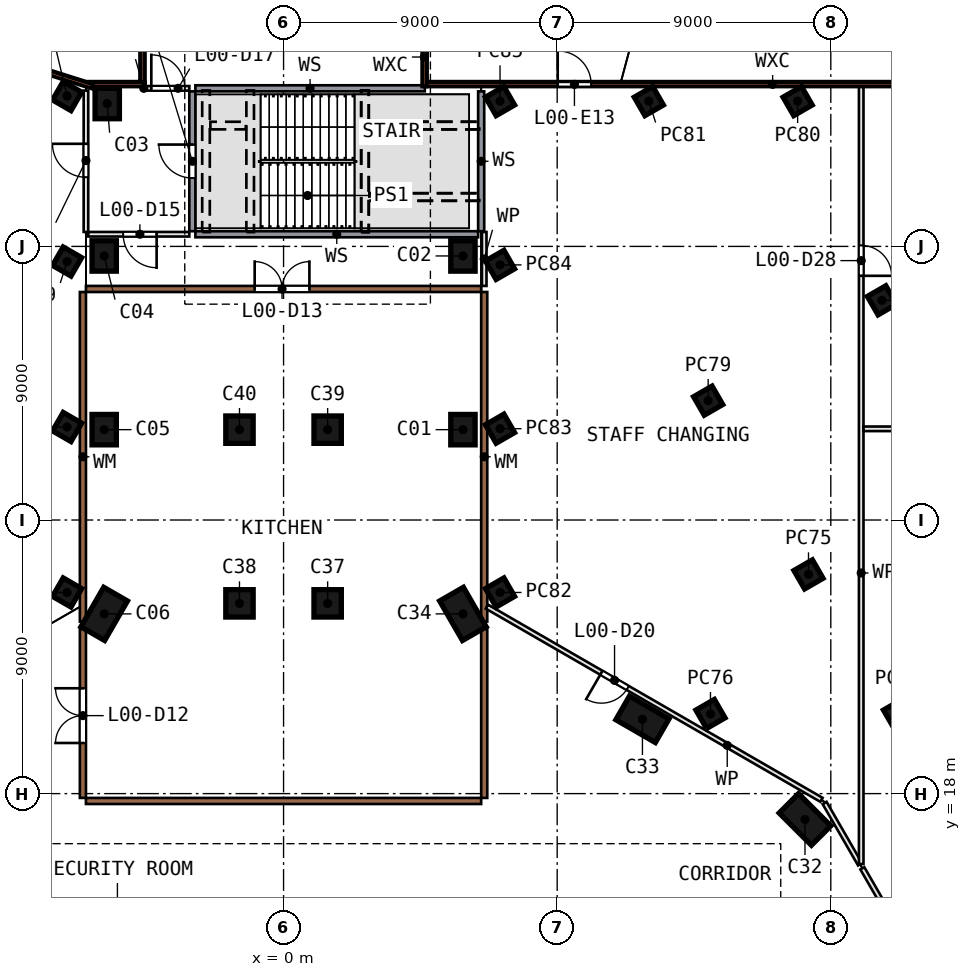
"""IFC4 building model, lengths in metres.
Left out: names, types, materials, properties, quantities, classifications, styles, units other than length and angle.
Written with IfcOpenShell. Run it as: python <this file> out.ifc"""

import sys

from ifc_helpers import new_model, si_unit, direction, frame, frame_2d, origin, origin_2d, place, context, subcontext, project, spatial, rectangle, extrude, element, fill, save


model = new_model("IFC4")
c1 = context("Model", 3, precision=1e-05, world=origin(), true_north=direction((0.0, 1.0)))
c2 = subcontext(c1, "Body", "Model", "MODEL_VIEW")
j1 = project(units=[si_unit("LENGTHUNIT", "METRE"), si_unit("PLANEANGLEUNIT", "RADIAN")], contexts=[c1])
p1 = place(None, origin())
s1 = spatial("IfcSite", under=j1, at=p1, CompositionType="ELEMENT")
p2 = place(p1, origin())
s2 = spatial("IfcBuilding", under=s1, at=p2, CompositionType="ELEMENT")
p3 = place(p2, origin())
s3 = spatial("IfcBuildingStorey", under=s2, at=p3, CompositionType="ELEMENT", Elevation=0.0)
for number, where, z_axis, x_axis in (
    (1, (5.9, 29.972, 0.0), (0.0, 0.0, 1.0), (0.0, 1.0, 0.0)),
    (2, (5.9, 35.686, 0.0), (0.0, 0.0, 1.0), (0.0, 1.0, 0.0)),
    (3, (-5.8, 40.7, 0.0), (0.0, 0.0, 1.0), (0.0, -1.0, 0.0)),
    (4, (-5.9, 35.686, 0.0), (0.0, 0.0, 1.0), (0.0, -1.0, 0.0)),
    (5, (-5.9, 29.972, 0.0), (0.0, 0.0, 1.0), (0.0, -1.0, 0.0)),
):
    element("IfcColumn", number, at=place(p3, frame(where, z_axis=z_axis, x_axis=x_axis)), inside=s3, PredefinedType="COLUMN", context=c2, shape_type="SweptSolid", body=[
        extrude(rectangle(XDim=1.0, YDim=0.8, at=origin_2d()), origin(), (0.0, 0.0, 1.0), 7.55),
    ])
for number, where, z_axis, x_axis in (
    (6, (-5.9, 23.912, 0.0), (0.0, 0.0, 1.0), (0.5, 0.866, 0.0)),
    (7, (17.151, 17.151, 0.0), (0.0, 0.0, 1.0), (0.707, -0.707, 0.0)),
    (8, (11.804, 20.445, 0.0), (0.0, 0.0, 1.0), (-0.866, 0.5, 0.0)),
    (9, (5.9, 23.912, 0.0), (0.0, 0.0, 1.0), (0.5, -0.866, 0.0)),
):
    element("IfcColumn", number, at=place(p3, frame(where, z_axis=z_axis, x_axis=x_axis)), inside=s3, PredefinedType="COLUMN", context=c2, shape_type="SweptSolid", body=[
        extrude(rectangle(XDim=1.5, YDim=0.9, at=origin_2d()), origin(), (0.0, 0.0, 1.0), 7.55),
    ])
for number, where, z_axis, x_axis in (
    (10, (1.45, 24.258, 0.0), (0.0, 0.0, 1.0), (0.0, 1.0, 0.0)),
    (11, (-1.45, 24.258, 0.0), (0.0, 0.0, 1.0), (0.0, 1.0, 0.0)),
    (12, (1.45, 29.972, 0.0), (0.0, 0.0, 1.0), (0.0, 1.0, 0.0)),
    (13, (-1.45, 29.972, 0.0), (0.0, 0.0, 1.0), (0.0, 1.0, 0.0)),
):
    element("IfcColumn", number, at=place(p3, frame(where, z_axis=z_axis, x_axis=x_axis)), inside=s3, PredefinedType="COLUMN", context=c2, shape_type="SweptSolid", body=[
        extrude(rectangle(XDim=0.9, YDim=0.9, at=origin_2d()), origin(), (0.0, 0.0, 1.0), 7.55),
    ])
for number, where, z_axis, x_axis in (
    (14, (-7.12, 40.946, 0.0), (0.0, 0.0, 1.0), (-0.866, 0.5, 0.0)),
    (15, (-7.12, 35.503, 0.0), (0.0, 0.0, 1.0), (-0.866, 0.5, 0.0)),
    (16, (-7.12, 30.059, 0.0), (0.0, 0.0, 1.0), (-0.866, 0.5, 0.0)),
    (17, (-7.12, 24.616, 0.0), (0.0, 0.0, 1.0), (-0.866, 0.5, 0.0)),
    (18, (20.211, 20.62, 0.0), (0.0, 0.0, 1.0), (0.866, 0.5, 0.0)),
    (19, (17.266, 25.211, 0.0), (0.0, 0.0, 1.0), (0.866, 0.5, 0.0)),
    (20, (14.042, 20.62, 0.0), (0.0, 0.0, 1.0), (0.866, 0.5, 0.0)),
    (21, (19.682, 34.227, 0.0), (0.0, 0.0, 1.0), (0.866, 0.5, 0.0)),
    (22, (13.966, 30.927, 0.0), (0.0, 0.0, 1.0), (0.866, 0.5, 0.0)),
    (23, (16.909, 40.78, 0.0), (0.0, 0.0, 1.0), (0.866, 0.5, 0.0)),
    (24, (12.014, 40.78, 0.0), (0.0, 0.0, 1.0), (0.866, 0.5, 0.0)),
    (25, (7.12, 24.616, 0.0), (0.0, 0.0, 1.0), (0.866, 0.5, 0.0)),
    (26, (7.12, 30.004, 0.0), (0.0, 0.0, 1.0), (0.866, 0.5, 0.0)),
    (27, (7.12, 35.392, 0.0), (0.0, 0.0, 1.0), (0.866, 0.5, 0.0)),
    (28, (7.12, 40.78, 0.0), (0.0, 0.0, 1.0), (0.866, 0.5, 0.0)),
):
    element("IfcColumn", number, at=place(p3, frame(where, z_axis=z_axis, x_axis=x_axis)), inside=s3, PredefinedType="COLUMN", context=c2, shape_type="SweptSolid", body=[
        extrude(rectangle(XDim=0.7, YDim=0.7, at=origin_2d()), origin(), (0.0, 0.0, 1.0), 8.0),
    ])
p4 = place(p3, frame((4.7, 41.33, 0.0), z_axis=(0.0, 0.0, 1.0), x_axis=(1.0, 0.0, 0.0)))
e29 = element("IfcWall", 29, at=p4, inside=s3, PredefinedType="SOLIDWALL", context=c2, shape_type="SweptSolid", body=[
    extrude(rectangle(XDim=17.156, YDim=0.14, at=frame_2d((8.578, 0.0))), origin(), (0.0, 0.0, 1.0), 7.55),
])
p5 = place(p4, frame((4.317, 0.0, 0.0)))
e30 = element("IfcOpeningElement", 30, at=p5, cuts=e29, PredefinedType="OPENING", context=c2, shape_type="SweptSolid", body=[
    extrude(rectangle(XDim=1.1, YDim=2.4, at=frame_2d((0.55, 1.2))), frame((0.0, 0.08, 0.0), z_axis=(0.0, -1.0, 0.0), x_axis=(1.0, 0.0, 0.0)), (0.0, 0.0, 1.0), 0.16),
])
p6 = place(p3, frame((4.63, 41.26, 0.0), z_axis=(0.0, 0.0, 1.0), x_axis=(0.0, 1.0, 0.0)))
e31 = element("IfcWall", 31, at=p6, inside=s3, PredefinedType="SOLIDWALL", context=c2, shape_type="SweptSolid", body=[
    extrude(rectangle(XDim=1.94, YDim=0.14, at=frame_2d((0.97, 0.0))), origin(), (0.0, 0.0, 1.0), 7.55),
])
p7 = place(p3, frame((-4.63, 43.06, 0.0), z_axis=(0.0, 0.0, 1.0), x_axis=(0.0, -1.0, 0.0)))
e32 = element("IfcWall", 32, at=p7, inside=s3, PredefinedType="SOLIDWALL", context=c2, shape_type="SweptSolid", body=[
    extrude(rectangle(XDim=1.66, YDim=0.14, at=frame_2d((0.83, 0.0))), origin(), (0.0, 0.0, 1.0), 7.55),
])
p8 = place(p3, frame((-4.56, 41.33, 0.0), z_axis=(0.0, 0.0, 1.0), x_axis=(-1.0, 0.0, 0.0)))
e33 = element("IfcWall", 33, at=p8, inside=s3, PredefinedType="SOLIDWALL", context=c2, shape_type="SweptSolid", body=[
    extrude(rectangle(XDim=1.719, YDim=0.14, at=frame_2d((0.859, 0.0))), origin(), (0.0, 0.0, 1.0), 7.55),
])
p9 = place(p3, frame((-6.289, 41.26, 0.0), z_axis=(0.0, 0.0, 1.0), x_axis=(-0.953524528, 0.301315407, 0.0)))
e34 = element("IfcWall", 34, at=p9, inside=s3, PredefinedType="SOLIDWALL", context=c2, shape_type="SweptSolid", body=[
    extrude(rectangle(XDim=12.38, YDim=0.14, at=frame_2d((6.19, 0.0))), origin(), (0.0, 0.0, 1.0), 7.55),
])
p10 = place(p3, frame((-6.5, 17.758, 0.0), z_axis=(0.0, 0.0, 1.0), x_axis=(1.0, 0.0, 0.0)))
e35 = element("IfcWall", 35, at=p10, inside=s3, PredefinedType="SOLIDWALL", context=c2, shape_type="SweptSolid", body=[
    extrude(rectangle(XDim=13.0, YDim=0.2, at=frame_2d((6.5, 0.0))), origin(), (0.0, 0.0, 1.0), 7.55),
])
p11 = place(p3, frame((-6.6, 17.858, 0.0), z_axis=(0.0, 0.0, 1.0), x_axis=(0.0, 1.0, 0.0)))
e36 = element("IfcWall", 36, at=p11, inside=s3, PredefinedType="SOLIDWALL", context=c2, shape_type="SweptSolid", body=[
    extrude(rectangle(XDim=5.557, YDim=0.2, at=frame_2d((2.778, 0.0))), origin(), (0.0, 0.0, 1.0), 7.55),
])
p12 = place(p11, frame((1.807, 0.0, 0.0)))
e37 = element("IfcOpeningElement", 37, at=p12, cuts=e36, PredefinedType="OPENING", context=c2, shape_type="SweptSolid", body=[
    extrude(rectangle(XDim=1.8, YDim=2.1, at=frame_2d((0.9, 1.05))), frame((0.0, 0.11, 0.0), z_axis=(0.0, -1.0, 0.0), x_axis=(1.0, 0.0, 0.0)), (0.0, 0.0, 1.0), 0.22),
])
p13 = place(p3, frame((-6.6, 34.5, 0.0), z_axis=(0.0, 0.0, 1.0), x_axis=(0.0, -1.0, 0.0)))
e38 = element("IfcWall", 38, at=p13, inside=s3, PredefinedType="SOLIDWALL", context=c2, shape_type="SweptSolid", body=[
    extrude(rectangle(XDim=10.841, YDim=0.2, at=frame_2d((5.42, 0.0))), origin(), (0.0, 0.0, 1.0), 7.55),
])
p14 = place(p3, frame((-6.5, 34.6, 0.0), z_axis=(0.0, 0.0, 1.0), x_axis=(1.0, 0.0, 0.0)))
e39 = element("IfcWall", 39, at=p14, inside=s3, PredefinedType="SOLIDWALL", context=c2, shape_type="SweptSolid", body=[
    extrude(rectangle(XDim=13.0, YDim=0.2, at=frame_2d((6.5, 0.0))), origin(), (0.0, 0.0, 1.0), 7.55),
])
p15 = place(p14, frame((5.55, 0.0, 0.0)))
e40 = element("IfcOpeningElement", 40, at=p15, cuts=e39, PredefinedType="OPENING", context=c2, shape_type="SweptSolid", body=[
    extrude(rectangle(XDim=1.8, YDim=2.1, at=frame_2d((0.9, 1.05))), frame((0.0, 0.11, 0.0), z_axis=(0.0, -1.0, 0.0), x_axis=(1.0, 0.0, 0.0)), (0.0, 0.0, 1.0), 0.22),
])
p16 = place(p3, frame((-3.1, 36.4, 0.0), z_axis=(0.0, 0.0, 1.0), x_axis=(-1.0, 0.0, 0.0)))
e41 = element("IfcWall", 41, at=p16, inside=s3, PredefinedType="PARTITIONING", context=c2, shape_type="SweptSolid", body=[
    extrude(rectangle(XDim=3.325, YDim=0.15, at=frame_2d((1.663, 0.0))), origin(), (0.0, 0.0, 1.0), 7.55),
])
p17 = place(p16, frame((1.075, 0.0, 0.0)))
e42 = element("IfcOpeningElement", 42, at=p17, cuts=e41, PredefinedType="OPENING", context=c2, shape_type="SweptSolid", body=[
    extrude(rectangle(XDim=1.1, YDim=2.1, at=frame_2d((0.55, 1.05))), frame((0.0, 0.085, 0.0), z_axis=(0.0, -1.0, 0.0), x_axis=(1.0, 0.0, 0.0)), (0.0, 0.0, 1.0), 0.17),
])
p18 = place(p3, frame((-6.5, 36.475, 0.0), z_axis=(0.0, 0.0, 1.0), x_axis=(0.0, 1.0, 0.0)))
e43 = element("IfcWall", 43, at=p18, inside=s3, PredefinedType="PARTITIONING", context=c2, shape_type="SweptSolid", body=[
    extrude(rectangle(XDim=4.65, YDim=0.15, at=frame_2d((2.325, 0.0))), origin(), (0.0, 0.0, 1.0), 7.55),
])
p19 = place(p18, frame((1.8, 0.0, 0.0)))
e44 = element("IfcOpeningElement", 44, at=p19, cuts=e43, PredefinedType="OPENING", context=c2, shape_type="SweptSolid", body=[
    extrude(rectangle(XDim=1.1, YDim=2.1, at=frame_2d((0.55, 1.05))), frame((0.0, 0.085, 0.0), z_axis=(0.0, -1.0, 0.0), x_axis=(1.0, 0.0, 0.0)), (0.0, 0.0, 1.0), 0.17),
])
p20 = place(p3, frame((-2.9, 36.4, 0.0), z_axis=(0.0, 0.0, 1.0), x_axis=(1.0, 0.0, 0.0)))
e45 = element("IfcWall", 45, at=p20, inside=s3, PredefinedType="SOLIDWALL", context=c2, shape_type="SweptSolid", body=[
    extrude(rectangle(XDim=9.3, YDim=0.2, at=frame_2d((4.65, 0.0))), origin(), (0.0, 0.0, 1.0), 7.55),
])
p21 = place(p3, frame((-4.645, 41.2, 0.0), z_axis=(0.0, 0.0, 1.0), x_axis=(1.0, 0.0, 0.0)))
e46 = element("IfcWall", 46, at=p21, inside=s3, PredefinedType="PARTITIONING", context=c2, shape_type="SweptSolid", body=[
    extrude(rectangle(XDim=1.545, YDim=0.15, at=frame_2d((0.772, 0.0))), origin(), (0.0, 0.0, 1.0), 7.55),
])
p22 = place(p21, frame((0.295, 0.0, 0.0)))
e47 = element("IfcOpeningElement", 47, at=p22, cuts=e46, PredefinedType="OPENING", context=c2, shape_type="SweptSolid", body=[
    extrude(rectangle(XDim=1.1, YDim=2.1, at=frame_2d((0.55, 1.05))), frame((0.0, 0.085, 0.0), z_axis=(0.0, -1.0, 0.0), x_axis=(1.0, 0.0, 0.0)), (0.0, 0.0, 1.0), 0.17),
])
p23 = place(p3, frame((-3.0, 36.5, 0.0), z_axis=(0.0, 0.0, 1.0), x_axis=(0.0, 1.0, 0.0)))
e48 = element("IfcWall", 48, at=p23, inside=s3, PredefinedType="SOLIDWALL", context=c2, shape_type="SweptSolid", body=[
    extrude(rectangle(XDim=4.6, YDim=0.2, at=frame_2d((2.3, 0.0))), origin(), (0.0, 0.0, 1.0), 7.55),
])
p24 = place(p23, frame((1.75, 0.0, 0.0)))
e49 = element("IfcOpeningElement", 49, at=p24, cuts=e48, PredefinedType="OPENING", context=c2, shape_type="SweptSolid", body=[
    extrude(rectangle(XDim=1.1, YDim=2.1, at=frame_2d((0.55, 1.05))), frame((0.0, 0.11, 0.0), z_axis=(0.0, -1.0, 0.0), x_axis=(1.0, 0.0, 0.0)), (0.0, 0.0, 1.0), 0.22),
])
p25 = place(p3, frame((6.5, 36.5, 0.0), z_axis=(0.0, 0.0, 1.0), x_axis=(0.0, 1.0, 0.0)))
e50 = element("IfcWall", 50, at=p25, inside=s3, PredefinedType="SOLIDWALL", context=c2, shape_type="SweptSolid", body=[
    extrude(rectangle(XDim=4.6, YDim=0.2, at=frame_2d((2.3, 0.0))), origin(), (0.0, 0.0, 1.0), 7.55),
])
p26 = place(p3, frame((4.645, 41.2, 0.0), z_axis=(0.0, 0.0, 1.0), x_axis=(-1.0, 0.0, 0.0)))
e51 = element("IfcWall", 51, at=p26, inside=s3, PredefinedType="SOLIDWALL", context=c2, shape_type="SweptSolid", body=[
    extrude(rectangle(XDim=7.545, YDim=0.2, at=frame_2d((3.772, 0.0))), origin(), (0.0, 0.0, 1.0), 7.55),
])
p27 = place(p3, frame((6.6, 17.858, 0.0), z_axis=(0.0, 0.0, 1.0), x_axis=(0.0, 1.0, 0.0)))
e52 = element("IfcWall", 52, at=p27, inside=s3, PredefinedType="SOLIDWALL", context=c2, shape_type="SweptSolid", body=[
    extrude(rectangle(XDim=5.557, YDim=0.2, at=frame_2d((2.778, 0.0))), origin(), (0.0, 0.0, 1.0), 7.55),
])
p28 = place(p3, frame((6.6, 23.659, 0.0), z_axis=(0.0, 0.0, 1.0), x_axis=(0.0, 1.0, 0.0)))
e53 = element("IfcWall", 53, at=p28, inside=s3, PredefinedType="SOLIDWALL", context=c2, shape_type="SweptSolid", body=[
    extrude(rectangle(XDim=10.841, YDim=0.2, at=frame_2d((5.42, 0.0))), origin(), (0.0, 0.0, 1.0), 7.55),
])
p29 = place(p3, frame((17.693, 17.796, 0.0), z_axis=(0.0, 0.0, 1.0), x_axis=(-0.866027563, 0.499996261, 0.0)))
e54 = element("IfcWall", 54, at=p29, inside=s3, PredefinedType="PARTITIONING", context=c2, shape_type="SweptSolid", body=[
    extrude(rectangle(XDim=12.709, YDim=0.15, at=frame_2d((6.355, 0.0))), origin(), (0.0, 0.0, 1.0), 7.55),
])
p30 = place(p29, frame((7.36, 0.0, 0.0)))
e55 = element("IfcOpeningElement", 55, at=p30, cuts=e54, PredefinedType="OPENING", context=c2, shape_type="SweptSolid", body=[
    extrude(rectangle(XDim=1.0, YDim=2.1, at=frame_2d((0.5, 1.05))), frame((0.0, 0.085, 0.0), z_axis=(0.0, -1.0, 0.0), x_axis=(1.0, 0.0, 0.0)), (0.0, 0.0, 1.0), 0.17),
])
p31 = place(p3, frame((6.6, 34.7, 0.0), z_axis=(0.0, 0.0, 1.0), x_axis=(0.0, 1.0, 0.0)))
e56 = element("IfcWall", 56, at=p31, inside=s3, PredefinedType="PARTITIONING", context=c2, shape_type="SweptSolid", body=[
    extrude(rectangle(XDim=1.775, YDim=0.15, at=frame_2d((0.888, 0.0))), origin(), (0.0, 0.0, 1.0), 7.55),
])
p32 = place(p3, frame((17.796, 17.693, 0.0), z_axis=(0.0, 0.0, 1.0), x_axis=(0.50002133, -0.866013088, 0.0)))
e57 = element("IfcWall", 57, at=p32, inside=s3, PredefinedType="PARTITIONING", context=c2, shape_type="SweptSolid", body=[
    extrude(rectangle(XDim=2.333, YDim=0.15, at=frame_2d((1.167, 0.0))), origin(), (0.0, 0.0, 1.0), 7.55),
])
p33 = place(p3, frame((19.0, 41.26, 0.0), z_axis=(0.0, 0.0, 1.0), x_axis=(0.0, -1.0, 0.0)))
e58 = element("IfcWall", 58, at=p33, inside=s3, PredefinedType="PARTITIONING", context=c2, shape_type="SweptSolid", body=[
    extrude(rectangle(XDim=25.577, YDim=0.15, at=frame_2d((12.789, 0.0))), origin(), (0.0, 0.0, 1.0), 7.55),
])
p34 = place(p33, frame((5.227, 0.0, 0.0)))
e59 = element("IfcOpeningElement", 59, at=p34, cuts=e58, PredefinedType="OPENING", context=c2, shape_type="SweptSolid", body=[
    extrude(rectangle(XDim=1.0, YDim=2.1, at=frame_2d((0.5, 1.05))), frame((0.0, 0.085, 0.0), z_axis=(0.0, -1.0, 0.0), x_axis=(1.0, 0.0, 0.0)), (0.0, 0.0, 1.0), 0.17),
])
p35 = place(p3, frame((19.037, 15.543, 0.0), z_axis=(0.0, 0.0, 1.0), x_axis=(0.499986809, -0.866033019, 0.0)))
e60 = element("IfcWall", 60, at=p35, inside=s3, PredefinedType="PARTITIONING", context=c2, shape_type="SweptSolid", body=[
    extrude(rectangle(XDim=10.366, YDim=0.15, at=frame_2d((5.183, 0.0))), origin(), (0.0, 0.0, 1.0), 7.55),
])
p36 = place(p35, frame((4.95, 0.0, 0.0)))
e61 = element("IfcOpeningElement", 61, at=p36, cuts=e60, PredefinedType="OPENING", context=c2, shape_type="SweptSolid", body=[
    extrude(rectangle(XDim=1.0, YDim=2.1, at=frame_2d((0.5, 1.05))), frame((0.0, 0.085, 0.0), z_axis=(0.0, -1.0, 0.0), x_axis=(1.0, 0.0, 0.0)), (0.0, 0.0, 1.0), 0.17),
])
p37 = place(p3, frame((19.075, 30.0, 0.0), z_axis=(0.0, 0.0, 1.0), x_axis=(1.0, 0.0, 0.0)))
e62 = element("IfcWall", 62, at=p37, inside=s3, PredefinedType="PARTITIONING", context=c2, shape_type="SweptSolid", body=[
    extrude(rectangle(XDim=7.85, YDim=0.15, at=frame_2d((3.925, 0.0))), origin(), (0.0, 0.0, 1.0), 7.55),
])
p38 = place(p5, origin())
e63 = element("IfcDoor", 63, at=p38, inside=s3, OperationType="SINGLE_SWING_LEFT", PredefinedType="DOOR", context=c2, shape_type="SweptSolid", body=[
    extrude(rectangle(XDim=1.1, YDim=2.4, at=frame_2d((0.55, 1.2))), frame((0.0, 0.025, 0.0), z_axis=(0.0, -1.0, 0.0), x_axis=(1.0, 0.0, 0.0)), (0.0, 0.0, 1.0), 0.05),
])
fill(e30, e63)
p39 = place(p12, origin())
e64 = element("IfcDoor", 64, at=p39, inside=s3, OperationType="DOUBLE_DOOR_SINGLE_SWING", PredefinedType="DOOR", context=c2, shape_type="SweptSolid", body=[
    extrude(rectangle(XDim=1.8, YDim=2.1, at=frame_2d((0.9, 1.05))), frame((0.0, 0.025, 0.0), z_axis=(0.0, -1.0, 0.0), x_axis=(1.0, 0.0, 0.0)), (0.0, 0.0, 1.0), 0.05),
])
fill(e37, e64)
p40 = place(p15, origin())
e65 = element("IfcDoor", 65, at=p40, inside=s3, OperationType="DOUBLE_DOOR_SINGLE_SWING", PredefinedType="DOOR", context=c2, shape_type="SweptSolid", body=[
    extrude(rectangle(XDim=1.8, YDim=2.1, at=frame_2d((0.9, 1.05))), frame((0.0, 0.025, 0.0), z_axis=(0.0, -1.0, 0.0), x_axis=(1.0, 0.0, 0.0)), (0.0, 0.0, 1.0), 0.05),
])
fill(e40, e65)
p41 = place(p17, origin())
e66 = element("IfcDoor", 66, at=p41, inside=s3, OperationType="SINGLE_SWING_LEFT", PredefinedType="DOOR", context=c2, shape_type="SweptSolid", body=[
    extrude(rectangle(XDim=1.1, YDim=2.1, at=frame_2d((0.55, 1.05))), frame((0.0, 0.025, 0.0), z_axis=(0.0, -1.0, 0.0), x_axis=(1.0, 0.0, 0.0)), (0.0, 0.0, 1.0), 0.05),
])
fill(e42, e66)
p42 = place(p19, origin())
e67 = element("IfcDoor", 67, at=p42, inside=s3, OperationType="SINGLE_SWING_RIGHT", PredefinedType="DOOR", context=c2, shape_type="SweptSolid", body=[
    extrude(rectangle(XDim=1.1, YDim=2.1, at=frame_2d((0.55, 1.05))), frame((0.0, 0.025, 0.0), z_axis=(0.0, -1.0, 0.0), x_axis=(1.0, 0.0, 0.0)), (0.0, 0.0, 1.0), 0.05),
])
fill(e44, e67)
p43 = place(p22, origin())
e68 = element("IfcDoor", 68, at=p43, inside=s3, OperationType="SINGLE_SWING_LEFT", PredefinedType="DOOR", context=c2, shape_type="SweptSolid", body=[
    extrude(rectangle(XDim=1.1, YDim=2.1, at=frame_2d((0.55, 1.05))), frame((0.0, 0.025, 0.0), z_axis=(0.0, -1.0, 0.0), x_axis=(1.0, 0.0, 0.0)), (0.0, 0.0, 1.0), 0.05),
])
fill(e47, e68)
p44 = place(p24, origin())
e69 = element("IfcDoor", 69, at=p44, inside=s3, OperationType="SINGLE_SWING_RIGHT", PredefinedType="DOOR", context=c2, shape_type="SweptSolid", body=[
    extrude(rectangle(XDim=1.1, YDim=2.1, at=frame_2d((0.55, 1.05))), frame((0.0, 0.025, 0.0), z_axis=(0.0, -1.0, 0.0), x_axis=(1.0, 0.0, 0.0)), (0.0, 0.0, 1.0), 0.05),
])
fill(e49, e69)
p45 = place(p30, origin())
e70 = element("IfcDoor", 70, at=p45, inside=s3, OperationType="SINGLE_SWING_RIGHT", PredefinedType="DOOR", context=c2, shape_type="SweptSolid", body=[
    extrude(rectangle(XDim=1.0, YDim=2.1, at=frame_2d((0.5, 1.05))), frame((0.0, 0.025, 0.0), z_axis=(0.0, -1.0, 0.0), x_axis=(1.0, 0.0, 0.0)), (0.0, 0.0, 1.0), 0.05),
])
fill(e55, e70)
p46 = place(p34, origin())
e71 = element("IfcDoor", 71, at=p46, inside=s3, OperationType="SINGLE_SWING_RIGHT", PredefinedType="DOOR", context=c2, shape_type="SweptSolid", body=[
    extrude(rectangle(XDim=1.0, YDim=2.1, at=frame_2d((0.5, 1.05))), frame((0.0, 0.025, 0.0), z_axis=(0.0, -1.0, 0.0), x_axis=(1.0, 0.0, 0.0)), (0.0, 0.0, 1.0), 0.05),
])
fill(e59, e71)
save(model, sys.argv[1])
